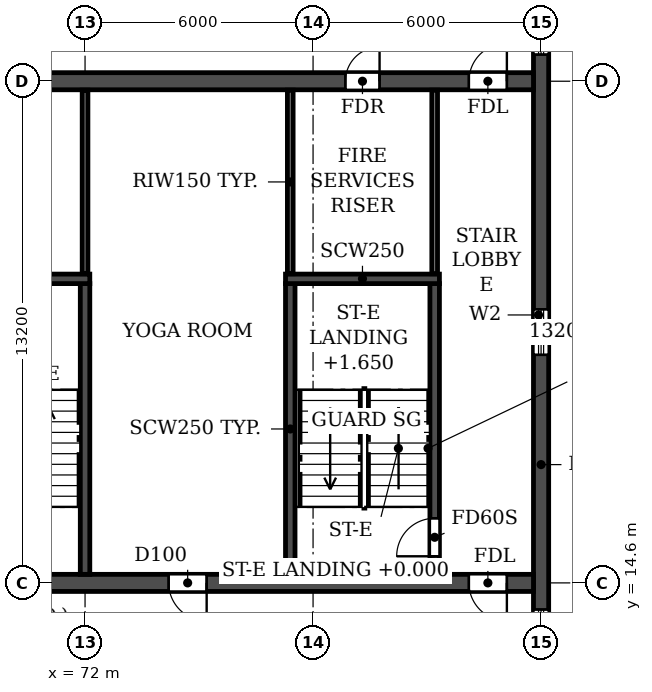
"""IFC4 building model, lengths in metres.
Left out: names, types, materials, properties, quantities, classifications, styles, units other than length and angle.
Written with IfcOpenShell. Run it as: python <this file> out.ifc"""

import sys

from ifc_helpers import new_model, si_unit, direction, frame, frame_2d, origin, place, context, subcontext, project, spatial, rectangle, extrude, element, fill, save


model = new_model("IFC4")
c1 = context("Model", 3, precision=1e-05, world=origin(), true_north=direction((0.0, 1.0)))
c2 = subcontext(c1, "Body", "Model", "MODEL_VIEW")
j1 = project(units=[si_unit("LENGTHUNIT", "METRE"), si_unit("PLANEANGLEUNIT", "RADIAN")], contexts=[c1])
p1 = place(None, origin())
s1 = spatial("IfcSite", under=j1, at=p1, CompositionType="ELEMENT")
p2 = place(p1, origin())
s2 = spatial("IfcBuilding", under=s1, at=p2, CompositionType="ELEMENT")
p3 = place(p2, frame((0.0, 0.0, 162.0)))
s3 = spatial("IfcBuildingStorey", under=s2, at=p3, CompositionType="ELEMENT", Elevation=162.0)
p4 = place(p3, frame((84.0, 4.683, 0.0), z_axis=(0.0, 0.0, 1.0), x_axis=(0.0, 1.0, 0.0)))
e1 = element("IfcWall", 1, at=p4, inside=s3, PredefinedType="SHEAR", context=c2, shape_type="SweptSolid", body=[
    extrude(rectangle(XDim=33.034, YDim=0.4, at=frame_2d((16.517, 0.0))), origin(), (0.0, 0.0, 1.0), 2.95),
])
p5 = place(p4, frame((23.817, 0.0, 0.9)))
e2 = element("IfcOpeningElement", 2, at=p5, cuts=e1, PredefinedType="OPENING", context=c2, shape_type="SweptSolid", body=[
    extrude(rectangle(XDim=1.2, YDim=1.5, at=frame_2d((0.6, 0.75))), frame((0.0, 0.21, 0.0), z_axis=(0.0, -1.0, 0.0), x_axis=(1.0, 0.0, 0.0)), (0.0, 0.0, 1.0), 0.42),
])
p6 = place(p4, frame((8.017, 0.0, 0.9)))
e3 = element("IfcOpeningElement", 3, at=p6, cuts=e1, PredefinedType="OPENING", context=c2, shape_type="SweptSolid", body=[
    extrude(rectangle(XDim=1.2, YDim=1.5, at=frame_2d((0.6, 0.75))), frame((0.0, 0.21, 0.0), z_axis=(0.0, -1.0, 0.0), x_axis=(1.0, 0.0, 0.0)), (0.0, 0.0, 1.0), 0.42),
])
p7 = place(p4, frame((28.293, 0.0, 0.6)))
e4 = element("IfcOpeningElement", 4, at=p7, cuts=e1, PredefinedType="OPENING", context=c2, shape_type="SweptSolid", body=[
    extrude(rectangle(XDim=2.2, YDim=1.8, at=frame_2d((1.1, 0.9))), frame((0.0, 0.21, 0.0), z_axis=(0.0, -1.0, 0.0), x_axis=(1.0, 0.0, 0.0)), (0.0, 0.0, 1.0), 0.42),
])
p8 = place(p4, frame((2.541, 0.0, 0.6)))
e5 = element("IfcOpeningElement", 5, at=p8, cuts=e1, PredefinedType="OPENING", context=c2, shape_type="SweptSolid", body=[
    extrude(rectangle(XDim=2.2, YDim=1.8, at=frame_2d((1.1, 0.9))), frame((0.0, 0.21, 0.0), z_axis=(0.0, -1.0, 0.0), x_axis=(1.0, 0.0, 0.0)), (0.0, 0.0, 1.0), 0.42),
])
p9 = place(p4, frame((15.917, 0.0, 0.9)))
e6 = element("IfcOpeningElement", 6, at=p9, cuts=e1, PredefinedType="OPENING", context=c2, shape_type="SweptSolid", body=[
    extrude(rectangle(XDim=1.2, YDim=1.5, at=frame_2d((0.6, 0.75))), frame((0.0, 0.21, 0.0), z_axis=(0.0, -1.0, 0.0), x_axis=(1.0, 0.0, 0.0)), (0.0, 0.0, 1.0), 0.42),
])
p10 = place(p3, frame((18.2, 14.6, 0.0), z_axis=(0.0, 0.0, 1.0), x_axis=(1.0, 0.0, 0.0)))
e7 = element("IfcWall", 7, at=p10, inside=s3, PredefinedType="SOLIDWALL", context=c2, shape_type="SweptSolid", body=[
    extrude(rectangle(XDim=65.6, YDim=0.45, at=frame_2d((32.8, 0.0))), origin(), (0.0, 0.0, 1.0), 2.95),
])
p11 = place(p10, frame((0.7, 0.0, 0.0)))
e8 = element("IfcOpeningElement", 8, at=p11, cuts=e7, PredefinedType="OPENING", context=c2, shape_type="SweptSolid", body=[
    extrude(rectangle(XDim=1.0, YDim=2.1, at=frame_2d((0.5, 1.05))), frame((0.0, 0.235, 0.0), z_axis=(0.0, -1.0, 0.0), x_axis=(1.0, 0.0, 0.0)), (0.0, 0.0, 1.0), 0.47),
])
p12 = place(p10, frame((8.6, 0.0, 0.0)))
e9 = element("IfcOpeningElement", 9, at=p12, cuts=e7, PredefinedType="OPENING", context=c2, shape_type="SweptSolid", body=[
    extrude(rectangle(XDim=1.0, YDim=2.1, at=frame_2d((0.5, 1.05))), frame((0.0, 0.235, 0.0), z_axis=(0.0, -1.0, 0.0), x_axis=(1.0, 0.0, 0.0)), (0.0, 0.0, 1.0), 0.47),
])
p13 = place(p10, frame((13.2, 0.0, 0.0)))
e10 = element("IfcOpeningElement", 10, at=p13, cuts=e7, PredefinedType="OPENING", context=c2, shape_type="SweptSolid", body=[
    extrude(rectangle(XDim=1.0, YDim=2.1, at=frame_2d((0.5, 1.05))), frame((0.0, 0.235, 0.0), z_axis=(0.0, -1.0, 0.0), x_axis=(1.0, 0.0, 0.0)), (0.0, 0.0, 1.0), 0.47),
])
p14 = place(p10, frame((27.1, 0.0, 0.0)))
e11 = element("IfcOpeningElement", 11, at=p14, cuts=e7, PredefinedType="OPENING", context=c2, shape_type="SweptSolid", body=[
    extrude(rectangle(XDim=1.0, YDim=2.1, at=frame_2d((0.5, 1.05))), frame((0.0, 0.235, 0.0), z_axis=(0.0, -1.0, 0.0), x_axis=(1.0, 0.0, 0.0)), (0.0, 0.0, 1.0), 0.47),
])
p15 = place(p10, frame((32.3, 0.0, 0.0)))
e12 = element("IfcOpeningElement", 12, at=p15, cuts=e7, PredefinedType="OPENING", context=c2, shape_type="SweptSolid", body=[
    extrude(rectangle(XDim=1.0, YDim=2.1, at=frame_2d((0.5, 1.05))), frame((0.0, 0.235, 0.0), z_axis=(0.0, -1.0, 0.0), x_axis=(1.0, 0.0, 0.0)), (0.0, 0.0, 1.0), 0.47),
])
p16 = place(p10, frame((35.95, 0.0, 0.0)))
e13 = element("IfcOpeningElement", 13, at=p16, cuts=e7, PredefinedType="OPENING", context=c2, shape_type="SweptSolid", body=[
    extrude(rectangle(XDim=1.5, YDim=2.1, at=frame_2d((0.75, 1.05))), frame((0.0, 0.235, 0.0), z_axis=(0.0, -1.0, 0.0), x_axis=(1.0, 0.0, 0.0)), (0.0, 0.0, 1.0), 0.47),
])
p17 = place(p10, frame((40.1, 0.0, 0.0)))
e14 = element("IfcOpeningElement", 14, at=p17, cuts=e7, PredefinedType="OPENING", context=c2, shape_type="SweptSolid", body=[
    extrude(rectangle(XDim=1.0, YDim=2.1, at=frame_2d((0.5, 1.05))), frame((0.0, 0.235, 0.0), z_axis=(0.0, -1.0, 0.0), x_axis=(1.0, 0.0, 0.0)), (0.0, 0.0, 1.0), 0.47),
])
p18 = place(p10, frame((51.4, 0.0, 0.0)))
e15 = element("IfcOpeningElement", 15, at=p18, cuts=e7, PredefinedType="OPENING", context=c2, shape_type="SweptSolid", body=[
    extrude(rectangle(XDim=1.0, YDim=2.1, at=frame_2d((0.5, 1.05))), frame((0.0, 0.235, 0.0), z_axis=(0.0, -1.0, 0.0), x_axis=(1.0, 0.0, 0.0)), (0.0, 0.0, 1.0), 0.47),
])
p19 = place(p10, frame((56.0, 0.0, 0.0)))
e16 = element("IfcOpeningElement", 16, at=p19, cuts=e7, PredefinedType="OPENING", context=c2, shape_type="SweptSolid", body=[
    extrude(rectangle(XDim=1.0, YDim=2.1, at=frame_2d((0.5, 1.05))), frame((0.0, 0.235, 0.0), z_axis=(0.0, -1.0, 0.0), x_axis=(1.0, 0.0, 0.0)), (0.0, 0.0, 1.0), 0.47),
])
p20 = place(p10, frame((63.9, 0.0, 0.0)))
e17 = element("IfcOpeningElement", 17, at=p20, cuts=e7, PredefinedType="OPENING", context=c2, shape_type="SweptSolid", body=[
    extrude(rectangle(XDim=1.0, YDim=2.1, at=frame_2d((0.5, 1.05))), frame((0.0, 0.235, 0.0), z_axis=(0.0, -1.0, 0.0), x_axis=(1.0, 0.0, 0.0)), (0.0, 0.0, 1.0), 0.47),
])
p21 = place(p3, frame((18.2, 27.8, 0.0), z_axis=(0.0, 0.0, 1.0), x_axis=(1.0, 0.0, 0.0)))
e18 = element("IfcWall", 18, at=p21, inside=s3, PredefinedType="SOLIDWALL", context=c2, shape_type="SweptSolid", body=[
    extrude(rectangle(XDim=65.6, YDim=0.45, at=frame_2d((32.8, 0.0))), origin(), (0.0, 0.0, 1.0), 2.95),
])
p22 = place(p21, frame((0.7, 0.0, 0.0)))
e19 = element("IfcOpeningElement", 19, at=p22, cuts=e18, PredefinedType="OPENING", context=c2, shape_type="SweptSolid", body=[
    extrude(rectangle(XDim=1.0, YDim=2.1, at=frame_2d((0.5, 1.05))), frame((0.0, 0.235, 0.0), z_axis=(0.0, -1.0, 0.0), x_axis=(1.0, 0.0, 0.0)), (0.0, 0.0, 1.0), 0.47),
])
p23 = place(p21, frame((4.05, 0.0, 0.0)))
e20 = element("IfcOpeningElement", 20, at=p23, cuts=e18, PredefinedType="OPENING", context=c2, shape_type="SweptSolid", body=[
    extrude(rectangle(XDim=0.9, YDim=2.1, at=frame_2d((0.45, 1.05))), frame((0.0, 0.235, 0.0), z_axis=(0.0, -1.0, 0.0), x_axis=(1.0, 0.0, 0.0)), (0.0, 0.0, 1.0), 0.47),
])
p24 = place(p21, frame((13.25, 0.0, 0.0)))
e21 = element("IfcOpeningElement", 21, at=p24, cuts=e18, PredefinedType="OPENING", context=c2, shape_type="SweptSolid", body=[
    extrude(rectangle(XDim=0.9, YDim=2.1, at=frame_2d((0.45, 1.05))), frame((0.0, 0.235, 0.0), z_axis=(0.0, -1.0, 0.0), x_axis=(1.0, 0.0, 0.0)), (0.0, 0.0, 1.0), 0.47),
])
p25 = place(p21, frame((17.7, 0.0, 0.0)))
e22 = element("IfcOpeningElement", 22, at=p25, cuts=e18, PredefinedType="OPENING", context=c2, shape_type="SweptSolid", body=[
    extrude(rectangle(XDim=1.0, YDim=2.1, at=frame_2d((0.5, 1.05))), frame((0.0, 0.235, 0.0), z_axis=(0.0, -1.0, 0.0), x_axis=(1.0, 0.0, 0.0)), (0.0, 0.0, 1.0), 0.47),
])
p26 = place(p21, frame((22.9, 0.0, 0.0)))
e23 = element("IfcOpeningElement", 23, at=p26, cuts=e18, PredefinedType="OPENING", context=c2, shape_type="SweptSolid", body=[
    extrude(rectangle(XDim=1.0, YDim=2.1, at=frame_2d((0.5, 1.05))), frame((0.0, 0.235, 0.0), z_axis=(0.0, -1.0, 0.0), x_axis=(1.0, 0.0, 0.0)), (0.0, 0.0, 1.0), 0.47),
])
p27 = place(p21, frame((29.4, 0.0, 0.0)))
e24 = element("IfcOpeningElement", 24, at=p27, cuts=e18, PredefinedType="OPENING", context=c2, shape_type="SweptSolid", body=[
    extrude(rectangle(XDim=1.0, YDim=2.1, at=frame_2d((0.5, 1.05))), frame((0.0, 0.235, 0.0), z_axis=(0.0, -1.0, 0.0), x_axis=(1.0, 0.0, 0.0)), (0.0, 0.0, 1.0), 0.47),
])
p28 = place(p21, frame((32.3, 0.0, 0.0)))
e25 = element("IfcOpeningElement", 25, at=p28, cuts=e18, PredefinedType="OPENING", context=c2, shape_type="SweptSolid", body=[
    extrude(rectangle(XDim=1.0, YDim=2.1, at=frame_2d((0.5, 1.05))), frame((0.0, 0.235, 0.0), z_axis=(0.0, -1.0, 0.0), x_axis=(1.0, 0.0, 0.0)), (0.0, 0.0, 1.0), 0.47),
])
p29 = place(p21, frame((36.25, 0.0, 0.0)))
e26 = element("IfcOpeningElement", 26, at=p29, cuts=e18, PredefinedType="OPENING", context=c2, shape_type="SweptSolid", body=[
    extrude(rectangle(XDim=1.5, YDim=2.1, at=frame_2d((0.75, 1.05))), frame((0.0, 0.235, 0.0), z_axis=(0.0, -1.0, 0.0), x_axis=(1.0, 0.0, 0.0)), (0.0, 0.0, 1.0), 0.47),
])
p30 = place(p21, frame((41.7, 0.0, 0.0)))
e27 = element("IfcOpeningElement", 27, at=p30, cuts=e18, PredefinedType="OPENING", context=c2, shape_type="SweptSolid", body=[
    extrude(rectangle(XDim=1.0, YDim=2.1, at=frame_2d((0.5, 1.05))), frame((0.0, 0.235, 0.0), z_axis=(0.0, -1.0, 0.0), x_axis=(1.0, 0.0, 0.0)), (0.0, 0.0, 1.0), 0.47),
])
p31 = place(p21, frame((46.9, 0.0, 0.0)))
e28 = element("IfcOpeningElement", 28, at=p31, cuts=e18, PredefinedType="OPENING", context=c2, shape_type="SweptSolid", body=[
    extrude(rectangle(XDim=1.0, YDim=2.1, at=frame_2d((0.5, 1.05))), frame((0.0, 0.235, 0.0), z_axis=(0.0, -1.0, 0.0), x_axis=(1.0, 0.0, 0.0)), (0.0, 0.0, 1.0), 0.47),
])
p32 = place(p21, frame((51.45, 0.0, 0.0)))
e29 = element("IfcOpeningElement", 29, at=p32, cuts=e18, PredefinedType="OPENING", context=c2, shape_type="SweptSolid", body=[
    extrude(rectangle(XDim=0.9, YDim=2.1, at=frame_2d((0.45, 1.05))), frame((0.0, 0.235, 0.0), z_axis=(0.0, -1.0, 0.0), x_axis=(1.0, 0.0, 0.0)), (0.0, 0.0, 1.0), 0.47),
])
p33 = place(p21, frame((60.65, 0.0, 0.0)))
e30 = element("IfcOpeningElement", 30, at=p33, cuts=e18, PredefinedType="OPENING", context=c2, shape_type="SweptSolid", body=[
    extrude(rectangle(XDim=0.9, YDim=2.1, at=frame_2d((0.45, 1.05))), frame((0.0, 0.235, 0.0), z_axis=(0.0, -1.0, 0.0), x_axis=(1.0, 0.0, 0.0)), (0.0, 0.0, 1.0), 0.47),
])
p34 = place(p21, frame((63.9, 0.0, 0.0)))
e31 = element("IfcOpeningElement", 31, at=p34, cuts=e18, PredefinedType="OPENING", context=c2, shape_type="SweptSolid", body=[
    extrude(rectangle(XDim=1.0, YDim=2.1, at=frame_2d((0.5, 1.05))), frame((0.0, 0.235, 0.0), z_axis=(0.0, -1.0, 0.0), x_axis=(1.0, 0.0, 0.0)), (0.0, 0.0, 1.0), 0.47),
])
p35 = place(p3, frame((72.0, 14.825, 0.0), z_axis=(0.0, 0.0, 1.0), x_axis=(0.0, 1.0, 0.0)))
e32 = element("IfcWall", 32, at=p35, inside=s3, PredefinedType="SOLIDWALL", context=c2, shape_type="SweptSolid", body=[
    extrude(rectangle(XDim=7.65, YDim=0.25, at=frame_2d((3.825, 0.0))), origin(), (0.0, 0.0, 1.0), 2.95),
])
p36 = place(p3, frame((68.075, 22.6, 0.0), z_axis=(0.0, 0.0, 1.0), x_axis=(1.0, 0.0, 0.0)))
e33 = element("IfcWall", 33, at=p36, inside=s3, PredefinedType="SOLIDWALL", context=c2, shape_type="SweptSolid", body=[
    extrude(rectangle(XDim=4.05, YDim=0.25, at=frame_2d((2.025, 0.0))), origin(), (0.0, 0.0, 1.0), 2.95),
])
p37 = place(p3, frame((77.4, 14.825, 0.0), z_axis=(0.0, 0.0, 1.0), x_axis=(0.0, 1.0, 0.0)))
e34 = element("IfcWall", 34, at=p37, inside=s3, PredefinedType="SOLIDWALL", context=c2, shape_type="SweptSolid", body=[
    extrude(rectangle(XDim=7.65, YDim=0.25, at=frame_2d((3.825, 0.0))), origin(), (0.0, 0.0, 1.0), 2.95),
])
p38 = place(p3, frame((81.2, 14.825, 0.0), z_axis=(0.0, 0.0, 1.0), x_axis=(0.0, 1.0, 0.0)))
e35 = element("IfcWall", 35, at=p38, inside=s3, PredefinedType="SOLIDWALL", context=c2, shape_type="SweptSolid", body=[
    extrude(rectangle(XDim=7.65, YDim=0.25, at=frame_2d((3.825, 0.0))), origin(), (0.0, 0.0, 1.0), 2.95),
])
p39 = place(p38, frame((0.475, 0.0, 0.0)))
e36 = element("IfcOpeningElement", 36, at=p39, cuts=e35, PredefinedType="OPENING", context=c2, shape_type="SweptSolid", body=[
    extrude(rectangle(XDim=1.0, YDim=2.1, at=frame_2d((0.5, 1.05))), frame((0.0, 0.135, 0.0), z_axis=(0.0, -1.0, 0.0), x_axis=(1.0, 0.0, 0.0)), (0.0, 0.0, 1.0), 0.27),
])
p40 = place(p3, frame((77.275, 22.6, 0.0), z_axis=(0.0, 0.0, 1.0), x_axis=(1.0, 0.0, 0.0)))
e37 = element("IfcWall", 37, at=p40, inside=s3, PredefinedType="SOLIDWALL", context=c2, shape_type="SweptSolid", body=[
    extrude(rectangle(XDim=4.05, YDim=0.25, at=frame_2d((2.025, 0.0))), origin(), (0.0, 0.0, 1.0), 2.95),
])
for number, where, z_axis, x_axis in (
    (38, (72.0, 22.735, 0.0), (0.0, 0.0, 1.0), (0.0, 1.0, 0.0)),
    (39, (77.4, 22.735, 0.0), (0.0, 0.0, 1.0), (0.0, 1.0, 0.0)),
    (40, (81.2, 22.735, 0.0), (0.0, 0.0, 1.0), (0.0, 1.0, 0.0)),
):
    element("IfcWall", number, at=place(p3, frame(where, z_axis=z_axis, x_axis=x_axis)), inside=s3, PredefinedType="PARTITIONING", context=c2, shape_type="SweptSolid", body=[
        extrude(rectangle(XDim=4.83, YDim=0.15, at=frame_2d((2.415, 0.0))), origin(), (0.0, 0.0, 1.0), 2.95),
    ])
p41 = place(p5, origin())
e41 = element("IfcWindow", 41, at=p41, inside=s3, PartitioningType="SINGLE_PANEL", PredefinedType="WINDOW", context=c2, shape_type="SweptSolid", body=[
    extrude(rectangle(XDim=1.2, YDim=1.5, at=frame_2d((0.6, 0.75))), frame((0.0, 0.03, 0.0), z_axis=(0.0, -1.0, 0.0), x_axis=(1.0, 0.0, 0.0)), (0.0, 0.0, 1.0), 0.06),
])
fill(e2, e41)
p42 = place(p6, origin())
e42 = element("IfcWindow", 42, at=p42, inside=s3, PartitioningType="SINGLE_PANEL", PredefinedType="WINDOW", context=c2, shape_type="SweptSolid", body=[
    extrude(rectangle(XDim=1.2, YDim=1.5, at=frame_2d((0.6, 0.75))), frame((0.0, 0.03, 0.0), z_axis=(0.0, -1.0, 0.0), x_axis=(1.0, 0.0, 0.0)), (0.0, 0.0, 1.0), 0.06),
])
fill(e3, e42)
p43 = place(p9, origin())
e43 = element("IfcWindow", 43, at=p43, inside=s3, PartitioningType="SINGLE_PANEL", PredefinedType="WINDOW", context=c2, shape_type="SweptSolid", body=[
    extrude(rectangle(XDim=1.2, YDim=1.5, at=frame_2d((0.6, 0.75))), frame((0.0, 0.03, 0.0), z_axis=(0.0, -1.0, 0.0), x_axis=(1.0, 0.0, 0.0)), (0.0, 0.0, 1.0), 0.06),
])
fill(e6, e43)
p44 = place(p33, origin())
e44 = element("IfcDoor", 44, at=p44, inside=s3, OperationType="SINGLE_SWING_RIGHT", PredefinedType="DOOR", context=c2, shape_type="SweptSolid", body=[
    extrude(rectangle(XDim=0.9, YDim=2.1, at=frame_2d((0.45, 1.05))), frame((0.0, 0.025, 0.0), z_axis=(0.0, -1.0, 0.0), x_axis=(1.0, 0.0, 0.0)), (0.0, 0.0, 1.0), 0.05),
])
fill(e30, e44)
p45 = place(p34, origin())
e45 = element("IfcDoor", 45, at=p45, inside=s3, OperationType="SINGLE_SWING_RIGHT", PredefinedType="DOOR", context=c2, shape_type="SweptSolid", body=[
    extrude(rectangle(XDim=1.0, YDim=2.1, at=frame_2d((0.5, 1.05))), frame((0.0, 0.025, 0.0), z_axis=(0.0, -1.0, 0.0), x_axis=(1.0, 0.0, 0.0)), (0.0, 0.0, 1.0), 0.05),
])
fill(e31, e45)
p46 = place(p19, frame((1.0, 0.0, 0.0), z_axis=(0.0, 0.0, 1.0), x_axis=(-1.0, 0.0, 0.0)))
e46 = element("IfcDoor", 46, at=p46, inside=s3, OperationType="SINGLE_SWING_LEFT", PredefinedType="DOOR", context=c2, shape_type="SweptSolid", body=[
    extrude(rectangle(XDim=1.0, YDim=2.1, at=frame_2d((0.5, 1.05))), frame((0.0, 0.025, 0.0), z_axis=(0.0, -1.0, 0.0), x_axis=(1.0, 0.0, 0.0)), (0.0, 0.0, 1.0), 0.05),
])
fill(e16, e46)
p47 = place(p20, frame((1.0, 0.0, 0.0), z_axis=(0.0, 0.0, 1.0), x_axis=(-1.0, 0.0, 0.0)))
e47 = element("IfcDoor", 47, at=p47, inside=s3, OperationType="SINGLE_SWING_LEFT", PredefinedType="DOOR", context=c2, shape_type="SweptSolid", body=[
    extrude(rectangle(XDim=1.0, YDim=2.1, at=frame_2d((0.5, 1.05))), frame((0.0, 0.025, 0.0), z_axis=(0.0, -1.0, 0.0), x_axis=(1.0, 0.0, 0.0)), (0.0, 0.0, 1.0), 0.05),
])
fill(e17, e47)
p48 = place(p39, origin())
e48 = element("IfcDoor", 48, at=p48, inside=s3, OperationType="SINGLE_SWING_LEFT", PredefinedType="DOOR", context=c2, shape_type="SweptSolid", body=[
    extrude(rectangle(XDim=1.0, YDim=2.1, at=frame_2d((0.5, 1.05))), frame((0.0, 0.025, 0.0), z_axis=(0.0, -1.0, 0.0), x_axis=(1.0, 0.0, 0.0)), (0.0, 0.0, 1.0), 0.05),
])
fill(e36, e48)
save(model, sys.argv[1])
